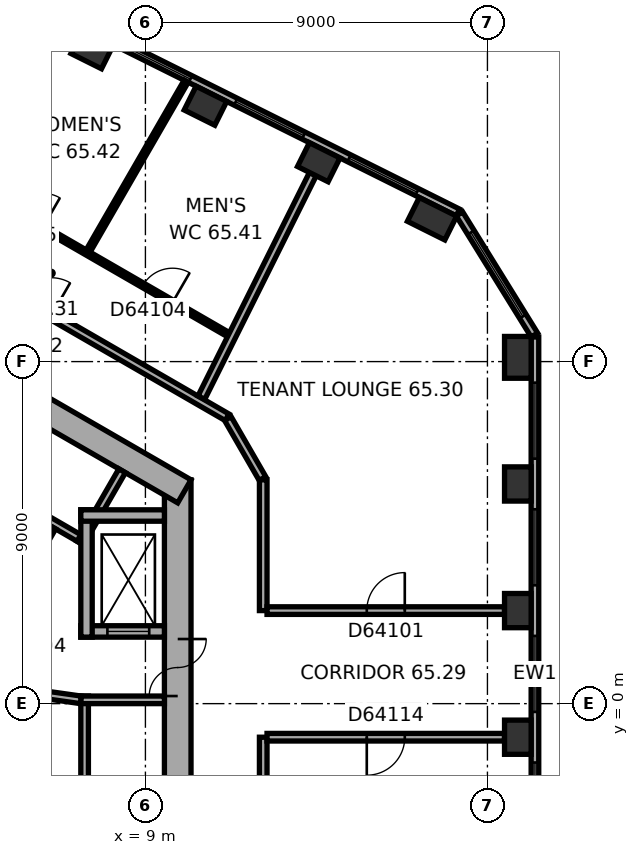
"""IFC4 building model, lengths in metres.
Left out: names, types, materials, properties, quantities, classifications, styles, units other than length and angle.
Written with IfcOpenShell. Run it as: python <this file> out.ifc"""

import sys

from ifc_helpers import new_model, si_unit, direction, frame, frame_2d, origin, origin_2d, place, context, subcontext, project, spatial, rectangle, extrude, element, fill, save


model = new_model("IFC4")
c1 = context("Model", 3, precision=1e-05, world=origin(), true_north=direction((0.0, 1.0)))
c2 = subcontext(c1, "Body", "Model", "MODEL_VIEW")
j1 = project(units=[si_unit("LENGTHUNIT", "METRE"), si_unit("PLANEANGLEUNIT", "RADIAN")], contexts=[c1])
p1 = place(None, origin())
s1 = spatial("IfcSite", under=j1, at=p1, CompositionType="ELEMENT")
p2 = place(p1, origin())
s2 = spatial("IfcBuilding", under=s1, at=p2, CompositionType="ELEMENT")
p3 = place(p2, frame((0.0, 0.0, 263.5)))
s3 = spatial("IfcBuildingStorey", under=s2, at=p3, CompositionType="ELEMENT", Elevation=263.5)
for number, where, z_axis, x_axis in (
    (1, (18.8, -0.883, 0.0), (0.0, 0.0, 1.0), (0.0, 1.0, 0.0)),
    (2, (18.8, 2.448, 0.0), (0.0, 0.0, 1.0), (0.0, 1.0, 0.0)),
    (3, (18.8, 5.78, 0.0), (0.0, 0.0, 1.0), (0.0, 1.0, 0.0)),
):
    element("IfcColumn", number, at=place(p3, frame(where, z_axis=z_axis, x_axis=x_axis)), inside=s3, PredefinedType="COLUMN", context=c2, shape_type="SweptSolid", body=[
        extrude(rectangle(XDim=0.9, YDim=0.7, at=origin_2d()), origin(), (0.0, 0.0, 1.0), 3.7),
    ])
for number, where, z_axis, x_axis in (
    (4, (18.8, 9.112, 0.0), (0.0, 0.0, 1.0), (0.0, 1.0, 0.0)),
    (5, (16.543, 12.759, 0.0), (0.0, 0.0, 1.0), (-0.895, 0.446, 0.0)),
):
    element("IfcColumn", number, at=place(p3, frame(where, z_axis=z_axis, x_axis=x_axis)), inside=s3, PredefinedType="COLUMN", context=c2, shape_type="SweptSolid", body=[
        extrude(rectangle(XDim=1.1, YDim=0.7, at=origin_2d()), origin(), (0.0, 0.0, 1.0), 3.7),
    ])
for number, where, z_axis, x_axis in (
    (6, (13.561, 14.246, 0.0), (0.0, 0.0, 1.0), (-0.895, 0.446, 0.0)),
    (7, (10.58, 15.732, 0.0), (0.0, 0.0, 1.0), (-0.895, 0.446, 0.0)),
    (8, (7.598, 17.219, 0.0), (0.0, 0.0, 1.0), (-0.895, 0.446, 0.0)),
):
    element("IfcColumn", number, at=place(p3, frame(where, z_axis=z_axis, x_axis=x_axis)), inside=s3, PredefinedType="COLUMN", context=c2, shape_type="SweptSolid", body=[
        extrude(rectangle(XDim=0.9, YDim=0.7, at=origin_2d()), origin(), (0.0, 0.0, 1.0), 3.7),
    ])
p4 = place(p3, frame((9.85, -5.889, 0.0), z_axis=(0.0, 0.0, 1.0), x_axis=(0.0, 1.0, 0.0)))
e9 = element("IfcWall", 9, at=p4, inside=s3, PredefinedType="SHEAR", context=c2, shape_type="SweptSolid", body=[
    extrude(rectangle(XDim=11.778, YDim=0.7, at=frame_2d((5.889, 0.0))), origin(), (0.0, 0.0, 1.0), 3.7),
])
p5 = place(p4, frame((6.089, 0.0, 0.0)))
e10 = element("IfcOpeningElement", 10, at=p5, cuts=e9, PredefinedType="OPENING", context=c2, shape_type="SweptSolid", body=[
    extrude(rectangle(XDim=1.5, YDim=2.1, at=frame_2d((0.75, 1.05))), frame((0.0, 0.36, 0.0), z_axis=(0.0, -1.0, 0.0), x_axis=(1.0, 0.0, 0.0)), (0.0, 0.0, 1.0), 0.72),
])
p6 = place(p4, frame((2.939, 0.0, 0.0)))
e11 = element("IfcOpeningElement", 11, at=p6, cuts=e9, PredefinedType="OPENING", context=c2, shape_type="SweptSolid", body=[
    extrude(rectangle(XDim=0.9, YDim=2.1, at=frame_2d((0.45, 1.05))), frame((0.0, 0.36, 0.0), z_axis=(0.0, -1.0, 0.0), x_axis=(1.0, 0.0, 0.0)), (0.0, 0.0, 1.0), 0.72),
])
p7 = place(p3, frame((10.025, 5.586, 0.0), z_axis=(0.0, 0.0, 1.0), x_axis=(-0.866026453023, 0.499998182661, 0.0)))
e12 = element("IfcWall", 12, at=p7, inside=s3, PredefinedType="SHEAR", context=c2, shape_type="SweptSolid", body=[
    extrude(rectangle(XDim=11.778, YDim=0.7, at=frame_2d((5.889, 0.0))), origin(), (0.0, 0.0, 1.0), 3.7),
])
p8 = place(p7, frame((5.139, 0.0, 0.0)))
e13 = element("IfcOpeningElement", 13, at=p8, cuts=e12, PredefinedType="OPENING", context=c2, shape_type="SweptSolid", body=[
    extrude(rectangle(XDim=0.9, YDim=2.1, at=frame_2d((0.45, 1.05))), frame((0.0, 0.36, 0.0), z_axis=(0.0, -1.0, 0.0), x_axis=(1.0, 0.0, 0.0)), (0.0, 0.0, 1.0), 0.72),
])
p9 = place(p3, frame((19.25, -8.084, 0.0), z_axis=(0.0, 0.0, 1.0), x_axis=(0.0, 1.0, 0.0)))
e14 = element("IfcWall", 14, at=p9, inside=s3, PredefinedType="STANDARD", context=c2, shape_type="SweptSolid", body=[
    extrude(rectangle(XDim=17.731, YDim=0.2, at=frame_2d((8.866, 0.0))), origin(), (0.0, 0.0, 1.0), 3.7),
])
p10 = place(p9, frame((1.203, 0.0, 0.9)))
e15 = element("IfcOpeningElement", 15, at=p10, cuts=e14, PredefinedType="OPENING", context=c2, shape_type="SweptSolid", body=[
    extrude(rectangle(XDim=2.0, YDim=2.0, at=frame_2d((1.0, 1.0))), frame((0.0, 0.11, 0.0), z_axis=(0.0, -1.0, 0.0), x_axis=(1.0, 0.0, 0.0)), (0.0, 0.0, 1.0), 0.22),
])
p11 = place(p9, frame((4.535, 0.0, 0.9)))
e16 = element("IfcOpeningElement", 16, at=p11, cuts=e14, PredefinedType="OPENING", context=c2, shape_type="SweptSolid", body=[
    extrude(rectangle(XDim=2.0, YDim=2.0, at=frame_2d((1.0, 1.0))), frame((0.0, 0.11, 0.0), z_axis=(0.0, -1.0, 0.0), x_axis=(1.0, 0.0, 0.0)), (0.0, 0.0, 1.0), 0.22),
])
p12 = place(p9, frame((7.866, 0.0, 0.9)))
e17 = element("IfcOpeningElement", 17, at=p12, cuts=e14, PredefinedType="OPENING", context=c2, shape_type="SweptSolid", body=[
    extrude(rectangle(XDim=2.0, YDim=2.0, at=frame_2d((1.0, 1.0))), frame((0.0, 0.11, 0.0), z_axis=(0.0, -1.0, 0.0), x_axis=(1.0, 0.0, 0.0)), (0.0, 0.0, 1.0), 0.22),
])
p13 = place(p9, frame((11.198, 0.0, 0.9)))
e18 = element("IfcOpeningElement", 18, at=p13, cuts=e14, PredefinedType="OPENING", context=c2, shape_type="SweptSolid", body=[
    extrude(rectangle(XDim=2.0, YDim=2.0, at=frame_2d((1.0, 1.0))), frame((0.0, 0.11, 0.0), z_axis=(0.0, -1.0, 0.0), x_axis=(1.0, 0.0, 0.0)), (0.0, 0.0, 1.0), 0.22),
])
p14 = place(p9, frame((14.53, 0.0, 0.9)))
e19 = element("IfcOpeningElement", 19, at=p14, cuts=e14, PredefinedType="OPENING", context=c2, shape_type="SweptSolid", body=[
    extrude(rectangle(XDim=2.0, YDim=2.0, at=frame_2d((1.0, 1.0))), frame((0.0, 0.11, 0.0), z_axis=(0.0, -1.0, 0.0), x_axis=(1.0, 0.0, 0.0)), (0.0, 0.0, 1.0), 0.22),
])
p15 = place(p3, frame((19.235, 9.7, 0.0), z_axis=(0.0, 0.0, 1.0), x_axis=(-0.526233475464, 0.850340125656, 0.0)))
e20 = element("IfcWall", 20, at=p15, inside=s3, PredefinedType="STANDARD", context=c2, shape_type="SweptSolid", body=[
    extrude(rectangle(XDim=3.747, YDim=0.2, at=frame_2d((1.874, 0.0))), origin(), (0.0, 0.0, 1.0), 3.7),
])
p16 = place(p15, frame((0.573, 0.0, 0.9)))
e21 = element("IfcOpeningElement", 21, at=p16, cuts=e20, PredefinedType="OPENING", context=c2, shape_type="SweptSolid", body=[
    extrude(rectangle(XDim=2.6, YDim=2.0, at=frame_2d((1.3, 1.0))), frame((0.0, 0.11, 0.0), z_axis=(0.0, -1.0, 0.0), x_axis=(1.0, 0.0, 0.0)), (0.0, 0.0, 1.0), 0.22),
])
p17 = place(p3, frame((17.223, 12.923, 0.0), z_axis=(0.0, 0.0, 1.0), x_axis=(-0.894930561148, 0.44620543556, 0.0)))
e22 = element("IfcWall", 22, at=p17, inside=s3, PredefinedType="STANDARD", context=c2, shape_type="SweptSolid", body=[
    extrude(rectangle(XDim=17.731, YDim=0.2, at=frame_2d((8.866, 0.0))), origin(), (0.0, 0.0, 1.0), 3.7),
])
p18 = place(p17, frame((1.202, 0.0, 0.9)))
e23 = element("IfcOpeningElement", 23, at=p18, cuts=e22, PredefinedType="OPENING", context=c2, shape_type="SweptSolid", body=[
    extrude(rectangle(XDim=2.0, YDim=2.0, at=frame_2d((1.0, 1.0))), frame((0.0, 0.11, 0.0), z_axis=(0.0, -1.0, 0.0), x_axis=(1.0, 0.0, 0.0)), (0.0, 0.0, 1.0), 0.22),
])
p19 = place(p17, frame((4.533, 0.0, 0.9)))
e24 = element("IfcOpeningElement", 24, at=p19, cuts=e22, PredefinedType="OPENING", context=c2, shape_type="SweptSolid", body=[
    extrude(rectangle(XDim=2.0, YDim=2.0, at=frame_2d((1.0, 1.0))), frame((0.0, 0.11, 0.0), z_axis=(0.0, -1.0, 0.0), x_axis=(1.0, 0.0, 0.0)), (0.0, 0.0, 1.0), 0.22),
])
p20 = place(p17, frame((7.865, 0.0, 0.9)))
e25 = element("IfcOpeningElement", 25, at=p20, cuts=e22, PredefinedType="OPENING", context=c2, shape_type="SweptSolid", body=[
    extrude(rectangle(XDim=2.0, YDim=2.0, at=frame_2d((1.0, 1.0))), frame((0.0, 0.11, 0.0), z_axis=(0.0, -1.0, 0.0), x_axis=(1.0, 0.0, 0.0)), (0.0, 0.0, 1.0), 0.22),
])
p21 = place(p17, frame((11.197, 0.0, 0.9)))
e26 = element("IfcOpeningElement", 26, at=p21, cuts=e22, PredefinedType="OPENING", context=c2, shape_type="SweptSolid", body=[
    extrude(rectangle(XDim=2.0, YDim=2.0, at=frame_2d((1.0, 1.0))), frame((0.0, 0.11, 0.0), z_axis=(0.0, -1.0, 0.0), x_axis=(1.0, 0.0, 0.0)), (0.0, 0.0, 1.0), 0.22),
])
p22 = place(p17, frame((14.528, 0.0, 0.9)))
e27 = element("IfcOpeningElement", 27, at=p22, cuts=e22, PredefinedType="OPENING", context=c2, shape_type="SweptSolid", body=[
    extrude(rectangle(XDim=2.0, YDim=2.0, at=frame_2d((1.0, 1.0))), frame((0.0, 0.11, 0.0), z_axis=(0.0, -1.0, 0.0), x_axis=(1.0, 0.0, 0.0)), (0.0, 0.0, 1.0), 0.22),
])
p23 = place(p3, frame((7.4, -5.2, 0.0), z_axis=(0.0, 0.0, 1.0), x_axis=(0.0, 1.0, 0.0)))
e28 = element("IfcWall", 28, at=p23, inside=s3, PredefinedType="PARTITIONING", context=c2, shape_type="SweptSolid", body=[
    extrude(rectangle(XDim=5.4, YDim=0.2, at=frame_2d((2.7, 0.0))), origin(), (0.0, 0.0, 1.0), 3.42),
])
p24 = place(p3, frame((7.3, 0.1, 0.0), z_axis=(0.0, 0.0, 1.0), x_axis=(1.0, 0.0, 0.0)))
e29 = element("IfcWall", 29, at=p24, inside=s3, PredefinedType="PARTITIONING", context=c2, shape_type="SweptSolid", body=[
    extrude(rectangle(XDim=2.2, YDim=0.2, at=frame_2d((1.1, 0.0))), origin(), (0.0, 0.0, 1.0), 3.42),
])
p25 = place(p3, frame((7.424, 4.259, 0.0), z_axis=(0.0, 0.0, 1.0), x_axis=(-0.866026010844, 0.49999894854, 0.0)))
e30 = element("IfcWall", 30, at=p25, inside=s3, PredefinedType="PARTITIONING", context=c2, shape_type="SweptSolid", body=[
    extrude(rectangle(XDim=8.0, YDim=0.2, at=frame_2d((4.0, 0.0))), origin(), (0.0, 0.0, 1.0), 3.42),
])
p26 = place(p3, frame((7.287, 4.222, 0.0), z_axis=(0.0, 0.0, 1.0), x_axis=(0.499946605688, 0.86605622881, 0.0)))
e31 = element("IfcWall", 31, at=p26, inside=s3, PredefinedType="PARTITIONING", context=c2, shape_type="SweptSolid", body=[
    extrude(rectangle(XDim=2.2, YDim=0.2, at=frame_2d((1.1, 0.0))), origin(), (0.0, 0.0, 1.0), 3.42),
])
p27 = place(p3, frame((4.158, 0.602, 0.0), z_axis=(0.0, 0.0, 1.0), x_axis=(0.499977259774, 0.866038532462, 0.0)))
e32 = element("IfcWall", 32, at=p27, inside=s3, PredefinedType="SHEAR", context=c2, shape_type="SweptSolid", body=[
    extrude(rectangle(XDim=4.7, YDim=0.3, at=frame_2d((2.35, 0.0))), origin(), (0.0, 0.0, 1.0), 3.42),
])
p28 = place(p27, frame((0.8, 0.0, 0.0)))
e33 = element("IfcOpeningElement", 33, at=p28, cuts=e32, PredefinedType="OPENING", context=c2, shape_type="SweptSolid", body=[
    extrude(rectangle(XDim=1.2, YDim=2.1, at=frame_2d((0.6, 1.05))), frame((0.0, 0.16, 0.0), z_axis=(0.0, -1.0, 0.0), x_axis=(1.0, 0.0, 0.0)), (0.0, 0.0, 1.0), 0.32),
])
p29 = place(p3, frame((4.816, -0.222, 0.0), z_axis=(0.0, 0.0, 1.0), x_axis=(0.499977259774, -0.866038532462, 0.0)))
e34 = element("IfcWall", 34, at=p29, inside=s3, PredefinedType="SHEAR", context=c2, shape_type="SweptSolid", body=[
    extrude(rectangle(XDim=4.7, YDim=0.3, at=frame_2d((2.35, 0.0))), origin(), (0.0, 0.0, 1.0), 3.42),
])
p30 = place(p3, frame((7.3, 1.9, 0.0), z_axis=(0.0, 0.0, 1.0), x_axis=(1.0, 0.0, 0.0)))
e35 = element("IfcWall", 35, at=p30, inside=s3, PredefinedType="SHEAR", context=c2, shape_type="SweptSolid", body=[
    extrude(rectangle(XDim=2.2, YDim=0.3, at=frame_2d((1.1, 0.0))), origin(), (0.0, 0.0, 1.0), 3.42),
])
p31 = place(p30, frame((0.7, 0.0, 0.0)))
e36 = element("IfcOpeningElement", 36, at=p31, cuts=e35, PredefinedType="OPENING", context=c2, shape_type="SweptSolid", body=[
    extrude(rectangle(XDim=1.1, YDim=2.1, at=frame_2d((0.55, 1.05))), frame((0.0, 0.16, 0.0), z_axis=(0.0, -1.0, 0.0), x_axis=(1.0, 0.0, 0.0)), (0.0, 0.0, 1.0), 0.32),
])
p32 = place(p3, frame((7.45, 1.75, 0.0), z_axis=(0.0, 0.0, 1.0), x_axis=(0.0, 1.0, 0.0)))
e37 = element("IfcWall", 37, at=p32, inside=s3, PredefinedType="SHEAR", context=c2, shape_type="SweptSolid", body=[
    extrude(rectangle(XDim=3.35, YDim=0.3, at=frame_2d((1.675, 0.0))), origin(), (0.0, 0.0, 1.0), 3.42),
])
p33 = place(p3, frame((7.3, 4.95, 0.0), z_axis=(0.0, 0.0, 1.0), x_axis=(1.0, 0.0, 0.0)))
e38 = element("IfcWall", 38, at=p33, inside=s3, PredefinedType="SHEAR", context=c2, shape_type="SweptSolid", body=[
    extrude(rectangle(XDim=2.2, YDim=0.3, at=frame_2d((1.1, 0.0))), origin(), (0.0, 0.0, 1.0), 3.42),
])
p34 = place(p3, frame((4.327, 0.521, 0.0), z_axis=(0.0, 0.0, 1.0), x_axis=(0.990124376366, -0.14019172346, 0.0)))
e39 = element("IfcWall", 39, at=p34, inside=s3, PredefinedType="PARTITIONING", context=c2, shape_type="SweptSolid", body=[
    extrude(rectangle(XDim=3.002, YDim=0.2, at=frame_2d((1.501, 0.0))), origin(), (0.0, 0.0, 1.0), 3.42),
])
p35 = place(p34, frame((1.15, 0.0, 0.0)))
e40 = element("IfcOpeningElement", 40, at=p35, cuts=e39, PredefinedType="OPENING", context=c2, shape_type="SweptSolid", body=[
    extrude(rectangle(XDim=0.9, YDim=2.1, at=frame_2d((0.45, 1.05))), frame((0.0, 0.11, 0.0), z_axis=(0.0, -1.0, 0.0), x_axis=(1.0, 0.0, 0.0)), (0.0, 0.0, 1.0), 0.22),
])
p36 = place(p3, frame((10.072, 16.376, 0.0), z_axis=(0.0, 0.0, 1.0), x_axis=(-0.499972385701, -0.86604134632, 0.0)))
e41 = element("IfcWall", 41, at=p36, inside=s3, PredefinedType="PARTITIONING", context=c2, shape_type="SweptSolid", body=[
    extrude(rectangle(XDim=5.158, YDim=0.12, at=frame_2d((2.579, 0.0))), origin(), (0.0, 0.0, 1.0), 2.87),
])
p37 = place(p3, frame((11.15, 7.534, 0.0), z_axis=(0.0, 0.0, 1.0), x_axis=(-0.866026603062, 0.499997922785, 0.0)))
e42 = element("IfcWall", 42, at=p37, inside=s3, PredefinedType="PARTITIONING", context=c2, shape_type="SweptSolid", body=[
    extrude(rectangle(XDim=11.738, YDim=0.2, at=frame_2d((5.869, 0.0))), origin(), (0.0, 0.0, 1.0), 3.42),
])
p38 = place(p37, frame((5.345, 0.0, 0.0)))
e43 = element("IfcOpeningElement", 43, at=p38, cuts=e42, PredefinedType="OPENING", context=c2, shape_type="SweptSolid", body=[
    extrude(rectangle(XDim=1.0, YDim=2.1, at=frame_2d((0.5, 1.05))), frame((0.0, 0.11, 0.0), z_axis=(0.0, -1.0, 0.0), x_axis=(1.0, 0.0, 0.0)), (0.0, 0.0, 1.0), 0.22),
])
p39 = place(p3, frame((11.187, 9.707, 0.0), z_axis=(0.0, 0.0, 1.0), x_axis=(-0.866033133531, 0.499986611447, 0.0)))
e44 = element("IfcWall", 44, at=p39, inside=s3, PredefinedType="PARTITIONING", context=c2, shape_type="SweptSolid", body=[
    extrude(rectangle(XDim=9.814, YDim=0.12, at=frame_2d((4.907, 0.0))), origin(), (0.0, 0.0, 1.0), 3.42),
])
p40 = place(p39, frame((8.349, 0.0, 0.0)))
e45 = element("IfcOpeningElement", 45, at=p40, cuts=e44, PredefinedType="OPENING", context=c2, shape_type="SweptSolid", body=[
    extrude(rectangle(XDim=1.0, YDim=2.1, at=frame_2d((0.5, 1.05))), frame((0.0, 0.07, 0.0), z_axis=(0.0, -1.0, 0.0), x_axis=(1.0, 0.0, 0.0)), (0.0, 0.0, 1.0), 0.14),
])
p41 = place(p39, frame((1.7, 0.0, 0.0)))
e46 = element("IfcOpeningElement", 46, at=p41, cuts=e44, PredefinedType="OPENING", context=c2, shape_type="SweptSolid", body=[
    extrude(rectangle(XDim=0.9, YDim=2.1, at=frame_2d((0.45, 1.05))), frame((0.0, 0.07, 0.0), z_axis=(0.0, -1.0, 0.0), x_axis=(1.0, 0.0, 0.0)), (0.0, 0.0, 1.0), 0.14),
])
p42 = place(p39, frame((5.642, 0.0, 0.0)))
e47 = element("IfcOpeningElement", 47, at=p42, cuts=e44, PredefinedType="OPENING", context=c2, shape_type="SweptSolid", body=[
    extrude(rectangle(XDim=0.9, YDim=2.1, at=frame_2d((0.45, 1.05))), frame((0.0, 0.07, 0.0), z_axis=(0.0, -1.0, 0.0), x_axis=(1.0, 0.0, 0.0)), (0.0, 0.0, 1.0), 0.14),
])
p43 = place(p3, frame((12.08, 5.924, 0.0), z_axis=(0.0, 0.0, 1.0), x_axis=(-0.500004960326, 0.86602253992, 0.0)))
e48 = element("IfcWall", 48, at=p43, inside=s3, PredefinedType="PARTITIONING", context=c2, shape_type="SweptSolid", body=[
    extrude(rectangle(XDim=1.82, YDim=0.2, at=frame_2d((0.91, 0.0))), origin(), (0.0, 0.0, 1.0), 3.42),
])
p44 = place(p3, frame((12.1, -5.849, 0.0), z_axis=(0.0, 0.0, 1.0), x_axis=(0.0, 1.0, 0.0)))
e49 = element("IfcWall", 49, at=p44, inside=s3, PredefinedType="PARTITIONING", context=c2, shape_type="SweptSolid", body=[
    extrude(rectangle(XDim=4.966, YDim=0.2, at=frame_2d((2.483, 0.0))), origin(), (0.0, 0.0, 1.0), 3.42),
])
p45 = place(p3, frame((12.1, 2.448, 0.0), z_axis=(0.0, 0.0, 1.0), x_axis=(0.0, 1.0, 0.0)))
e50 = element("IfcWall", 50, at=p45, inside=s3, PredefinedType="PARTITIONING", context=c2, shape_type="SweptSolid", body=[
    extrude(rectangle(XDim=3.441, YDim=0.2, at=frame_2d((1.72, 0.0))), origin(), (0.0, 0.0, 1.0), 3.42),
])
p46 = place(p3, frame((12.2, -0.883, 0.0), z_axis=(0.0, 0.0, 1.0), x_axis=(1.0, 0.0, 0.0)))
e51 = element("IfcWall", 51, at=p46, inside=s3, PredefinedType="PARTITIONING", context=c2, shape_type="SweptSolid", body=[
    extrude(rectangle(XDim=6.25, YDim=0.2, at=frame_2d((3.125, 0.0))), origin(), (0.0, 0.0, 1.0), 2.87),
])
p47 = place(p46, frame((2.625, 0.0, 0.0)))
e52 = element("IfcOpeningElement", 52, at=p47, cuts=e51, PredefinedType="OPENING", context=c2, shape_type="SweptSolid", body=[
    extrude(rectangle(XDim=1.0, YDim=2.1, at=frame_2d((0.5, 1.05))), frame((0.0, 0.11, 0.0), z_axis=(0.0, -1.0, 0.0), x_axis=(1.0, 0.0, 0.0)), (0.0, 0.0, 1.0), 0.22),
])
p48 = place(p3, frame((13.405, 13.933, 0.0), z_axis=(0.0, 0.0, 1.0), x_axis=(-0.446187838644, -0.894939334618, 0.0)))
e53 = element("IfcWall", 53, at=p48, inside=s3, PredefinedType="PARTITIONING", context=c2, shape_type="SweptSolid", body=[
    extrude(rectangle(XDim=6.571, YDim=0.2, at=frame_2d((3.286, 0.0))), origin(), (0.0, 0.0, 1.0), 3.42),
])
p49 = place(p3, frame((18.45, 2.448, 0.0), z_axis=(0.0, 0.0, 1.0), x_axis=(-1.0, 0.0, 0.0)))
e54 = element("IfcWall", 54, at=p49, inside=s3, PredefinedType="PARTITIONING", context=c2, shape_type="SweptSolid", body=[
    extrude(rectangle(XDim=6.25, YDim=0.2, at=frame_2d((3.125, 0.0))), origin(), (0.0, 0.0, 1.0), 3.42),
])
p50 = place(p49, frame((2.625, 0.0, 0.0)))
e55 = element("IfcOpeningElement", 55, at=p50, cuts=e54, PredefinedType="OPENING", context=c2, shape_type="SweptSolid", body=[
    extrude(rectangle(XDim=1.0, YDim=2.1, at=frame_2d((0.5, 1.05))), frame((0.0, 0.11, 0.0), z_axis=(0.0, -1.0, 0.0), x_axis=(1.0, 0.0, 0.0)), (0.0, 0.0, 1.0), 0.22),
])
p51 = place(p11, origin())
e56 = element("IfcWindow", 56, at=p51, inside=s3, PartitioningType="SINGLE_PANEL", PredefinedType="WINDOW", context=c2, shape_type="SweptSolid", body=[
    extrude(rectangle(XDim=2.0, YDim=2.0, at=frame_2d((1.0, 1.0))), frame((0.0, 0.03, 0.0), z_axis=(0.0, -1.0, 0.0), x_axis=(1.0, 0.0, 0.0)), (0.0, 0.0, 1.0), 0.06),
])
fill(e16, e56)
p52 = place(p12, origin())
e57 = element("IfcWindow", 57, at=p52, inside=s3, PartitioningType="SINGLE_PANEL", PredefinedType="WINDOW", context=c2, shape_type="SweptSolid", body=[
    extrude(rectangle(XDim=2.0, YDim=2.0, at=frame_2d((1.0, 1.0))), frame((0.0, 0.03, 0.0), z_axis=(0.0, -1.0, 0.0), x_axis=(1.0, 0.0, 0.0)), (0.0, 0.0, 1.0), 0.06),
])
fill(e17, e57)
p53 = place(p13, origin())
e58 = element("IfcWindow", 58, at=p53, inside=s3, PartitioningType="SINGLE_PANEL", PredefinedType="WINDOW", context=c2, shape_type="SweptSolid", body=[
    extrude(rectangle(XDim=2.0, YDim=2.0, at=frame_2d((1.0, 1.0))), frame((0.0, 0.03, 0.0), z_axis=(0.0, -1.0, 0.0), x_axis=(1.0, 0.0, 0.0)), (0.0, 0.0, 1.0), 0.06),
])
fill(e18, e58)
p54 = place(p14, origin())
e59 = element("IfcWindow", 59, at=p54, inside=s3, PartitioningType="SINGLE_PANEL", PredefinedType="WINDOW", context=c2, shape_type="SweptSolid", body=[
    extrude(rectangle(XDim=2.0, YDim=2.0, at=frame_2d((1.0, 1.0))), frame((0.0, 0.03, 0.0), z_axis=(0.0, -1.0, 0.0), x_axis=(1.0, 0.0, 0.0)), (0.0, 0.0, 1.0), 0.06),
])
fill(e19, e59)
p55 = place(p16, origin())
e60 = element("IfcWindow", 60, at=p55, inside=s3, PartitioningType="SINGLE_PANEL", PredefinedType="WINDOW", context=c2, shape_type="SweptSolid", body=[
    extrude(rectangle(XDim=2.6, YDim=2.0, at=frame_2d((1.3, 1.0))), frame((0.0, 0.03, 0.0), z_axis=(0.0, -1.0, 0.0), x_axis=(1.0, 0.0, 0.0)), (0.0, 0.0, 1.0), 0.06),
])
fill(e21, e60)
p56 = place(p18, origin())
e61 = element("IfcWindow", 61, at=p56, inside=s3, PartitioningType="SINGLE_PANEL", PredefinedType="WINDOW", context=c2, shape_type="SweptSolid", body=[
    extrude(rectangle(XDim=2.0, YDim=2.0, at=frame_2d((1.0, 1.0))), frame((0.0, 0.03, 0.0), z_axis=(0.0, -1.0, 0.0), x_axis=(1.0, 0.0, 0.0)), (0.0, 0.0, 1.0), 0.06),
])
fill(e23, e61)
p57 = place(p19, origin())
e62 = element("IfcWindow", 62, at=p57, inside=s3, PartitioningType="SINGLE_PANEL", PredefinedType="WINDOW", context=c2, shape_type="SweptSolid", body=[
    extrude(rectangle(XDim=2.0, YDim=2.0, at=frame_2d((1.0, 1.0))), frame((0.0, 0.03, 0.0), z_axis=(0.0, -1.0, 0.0), x_axis=(1.0, 0.0, 0.0)), (0.0, 0.0, 1.0), 0.06),
])
fill(e24, e62)
p58 = place(p20, origin())
e63 = element("IfcWindow", 63, at=p58, inside=s3, PartitioningType="SINGLE_PANEL", PredefinedType="WINDOW", context=c2, shape_type="SweptSolid", body=[
    extrude(rectangle(XDim=2.0, YDim=2.0, at=frame_2d((1.0, 1.0))), frame((0.0, 0.03, 0.0), z_axis=(0.0, -1.0, 0.0), x_axis=(1.0, 0.0, 0.0)), (0.0, 0.0, 1.0), 0.06),
])
fill(e25, e63)
p59 = place(p5, origin())
e64 = element("IfcDoor", 64, at=p59, inside=s3, OperationType="DOUBLE_DOOR_SINGLE_SWING", PredefinedType="DOOR", context=c2, shape_type="SweptSolid", body=[
    extrude(rectangle(XDim=1.5, YDim=2.1, at=frame_2d((0.75, 1.05))), frame((0.0, 0.025, 0.0), z_axis=(0.0, -1.0, 0.0), x_axis=(1.0, 0.0, 0.0)), (0.0, 0.0, 1.0), 0.05),
])
fill(e10, e64)
p60 = place(p31, origin())
e65 = element("IfcDoor", 65, at=p60, inside=s3, OperationType="DOUBLE_DOOR_SLIDING", PredefinedType="DOOR", context=c2, shape_type="SweptSolid", body=[
    extrude(rectangle(XDim=1.1, YDim=2.1, at=frame_2d((0.55, 1.05))), frame((0.0, 0.025, 0.0), z_axis=(0.0, -1.0, 0.0), x_axis=(1.0, 0.0, 0.0)), (0.0, 0.0, 1.0), 0.05),
])
fill(e36, e65)
p61 = place(p50, origin())
e66 = element("IfcDoor", 66, at=p61, inside=s3, OperationType="SINGLE_SWING_LEFT", PredefinedType="DOOR", context=c2, shape_type="SweptSolid", body=[
    extrude(rectangle(XDim=1.0, YDim=2.1, at=frame_2d((0.5, 1.05))), frame((0.0, 0.025, 0.0), z_axis=(0.0, -1.0, 0.0), x_axis=(1.0, 0.0, 0.0)), (0.0, 0.0, 1.0), 0.05),
])
fill(e55, e66)
p62 = place(p41, origin())
e67 = element("IfcDoor", 67, at=p62, inside=s3, OperationType="SINGLE_SWING_LEFT", PredefinedType="DOOR", context=c2, shape_type="SweptSolid", body=[
    extrude(rectangle(XDim=0.9, YDim=2.1, at=frame_2d((0.45, 1.05))), frame((0.0, 0.025, 0.0), z_axis=(0.0, -1.0, 0.0), x_axis=(1.0, 0.0, 0.0)), (0.0, 0.0, 1.0), 0.05),
])
fill(e46, e67)
p63 = place(p47, origin())
e68 = element("IfcDoor", 68, at=p63, inside=s3, OperationType="SINGLE_SWING_LEFT", PredefinedType="DOOR", context=c2, shape_type="SweptSolid", body=[
    extrude(rectangle(XDim=1.0, YDim=2.1, at=frame_2d((0.5, 1.05))), frame((0.0, 0.025, 0.0), z_axis=(0.0, -1.0, 0.0), x_axis=(1.0, 0.0, 0.0)), (0.0, 0.0, 1.0), 0.05),
])
fill(e52, e68)
save(model, sys.argv[1])
